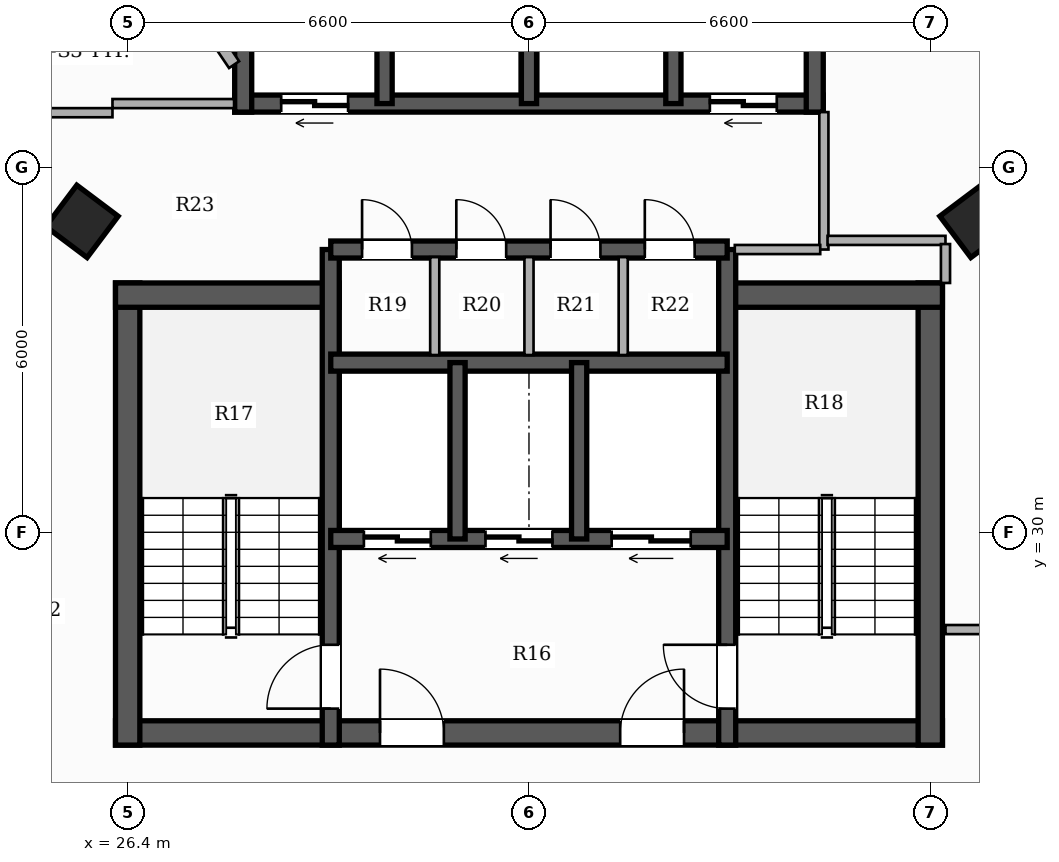
"""IFC4 building model, lengths in metres.
Left out: names, types, materials, properties, quantities, classifications, styles, units other than length and angle.
Written with IfcOpenShell. Run it as: python <this file> out.ifc"""

import sys

from ifc_helpers import new_model, si_unit, direction, frame, frame_2d, origin, origin_2d, place, context, subcontext, project, spatial, rectangle, hollow_rectangle, extrude, element, fill, save


model = new_model("IFC4")
c1 = context("Model", 3, precision=1e-05, world=origin(), true_north=direction((0.0, 1.0)))
c2 = subcontext(c1, "Body", "Model", "MODEL_VIEW")
j1 = project(units=[si_unit("LENGTHUNIT", "METRE"), si_unit("PLANEANGLEUNIT", "RADIAN")], contexts=[c1])
p1 = place(None, origin())
s1 = spatial("IfcSite", under=j1, at=p1, CompositionType="ELEMENT")
p2 = place(p1, origin())
s2 = spatial("IfcBuilding", under=s1, at=p2, CompositionType="ELEMENT")
p3 = place(p2, frame((0.0, 0.0, 183.65)))
s3 = spatial("IfcBuildingStorey", under=s2, at=p3, CompositionType="ELEMENT", Elevation=183.65)
p4 = place(p3, frame((26.2, 26.7, 0.0), z_axis=(0.0, 0.0, 1.0), x_axis=(1.0, 0.0, 0.0)))
e1 = element("IfcWall", 1, at=p4, inside=s3, PredefinedType="SHEAR", context=c2, shape_type="SweptSolid", body=[
    extrude(rectangle(XDim=13.6, YDim=0.4, at=frame_2d((6.8, 0.0))), origin(), (0.0, 0.0, 1.0), 3.3),
])
p5 = place(p4, frame((4.35, 0.0, 0.0)))
e2 = element("IfcOpeningElement", 2, at=p5, cuts=e1, PredefinedType="OPENING", context=c2, shape_type="SweptSolid", body=[
    extrude(rectangle(XDim=1.05, YDim=2.15, at=frame_2d((0.525, 1.075))), frame((0.0, 0.21, 0.0), z_axis=(0.0, -1.0, 0.0), x_axis=(1.0, 0.0, 0.0)), (0.0, 0.0, 1.0), 0.42),
])
p6 = place(p4, frame((8.3, 0.0, 0.0)))
e3 = element("IfcOpeningElement", 3, at=p6, cuts=e1, PredefinedType="OPENING", context=c2, shape_type="SweptSolid", body=[
    extrude(rectangle(XDim=1.05, YDim=2.15, at=frame_2d((0.525, 1.075))), frame((0.0, 0.21, 0.0), z_axis=(0.0, -1.0, 0.0), x_axis=(1.0, 0.0, 0.0)), (0.0, 0.0, 1.0), 0.42),
])
p7 = place(p3, frame((26.4, 26.5, 0.0), z_axis=(0.0, 0.0, 1.0), x_axis=(0.0, 1.0, 0.0)))
e4 = element("IfcWall", 4, at=p7, inside=s3, PredefinedType="SHEAR", context=c2, shape_type="SweptSolid", body=[
    extrude(rectangle(XDim=7.6, YDim=0.4, at=frame_2d((3.8, 0.0))), origin(), (0.0, 0.0, 1.0), 3.3),
])
p8 = place(p3, frame((26.2, 33.9, 0.0), z_axis=(0.0, 0.0, 1.0), x_axis=(1.0, 0.0, 0.0)))
e5 = element("IfcWall", 5, at=p8, inside=s3, PredefinedType="SHEAR", context=c2, shape_type="SweptSolid", body=[
    extrude(rectangle(XDim=3.68, YDim=0.4, at=frame_2d((1.84, 0.0))), origin(), (0.0, 0.0, 1.0), 3.3),
])
p9 = place(p3, frame((39.6, 26.5, 0.0), z_axis=(0.0, 0.0, 1.0), x_axis=(0.0, 1.0, 0.0)))
e6 = element("IfcWall", 6, at=p9, inside=s3, PredefinedType="SHEAR", context=c2, shape_type="SweptSolid", body=[
    extrude(rectangle(XDim=7.6, YDim=0.4, at=frame_2d((3.8, 0.0))), origin(), (0.0, 0.0, 1.0), 3.3),
])
p10 = place(p3, frame((36.12, 33.9, 0.0), z_axis=(0.0, 0.0, 1.0), x_axis=(1.0, 0.0, 0.0)))
e7 = element("IfcWall", 7, at=p10, inside=s3, PredefinedType="SHEAR", context=c2, shape_type="SweptSolid", body=[
    extrude(rectangle(XDim=3.68, YDim=0.4, at=frame_2d((1.84, 0.0))), origin(), (0.0, 0.0, 1.0), 3.3),
])
p11 = place(p3, frame((29.74, 26.5, 0.0), z_axis=(0.0, 0.0, 1.0), x_axis=(0.0, 1.0, 0.0)))
e8 = element("IfcWall", 8, at=p11, inside=s3, PredefinedType="SHEAR", context=c2, shape_type="SweptSolid", body=[
    extrude(rectangle(XDim=8.15, YDim=0.28, at=frame_2d((4.075, 0.0))), origin(), (0.0, 0.0, 1.0), 3.3),
])
p12 = place(p11, frame((0.6, 0.0, 0.0)))
e9 = element("IfcOpeningElement", 9, at=p12, cuts=e8, PredefinedType="OPENING", context=c2, shape_type="SweptSolid", body=[
    extrude(rectangle(XDim=1.05, YDim=2.15, at=frame_2d((0.525, 1.075))), frame((0.0, 0.15, 0.0), z_axis=(0.0, -1.0, 0.0), x_axis=(1.0, 0.0, 0.0)), (0.0, 0.0, 1.0), 0.3),
])
p13 = place(p3, frame((36.26, 26.5, 0.0), z_axis=(0.0, 0.0, 1.0), x_axis=(0.0, 1.0, 0.0)))
e10 = element("IfcWall", 10, at=p13, inside=s3, PredefinedType="SHEAR", context=c2, shape_type="SweptSolid", body=[
    extrude(rectangle(XDim=8.15, YDim=0.28, at=frame_2d((4.075, 0.0))), origin(), (0.0, 0.0, 1.0), 3.3),
])
p14 = place(p13, frame((0.6, 0.0, 0.0)))
e11 = element("IfcOpeningElement", 11, at=p14, cuts=e10, PredefinedType="OPENING", context=c2, shape_type="SweptSolid", body=[
    extrude(rectangle(XDim=1.05, YDim=2.15, at=frame_2d((0.525, 1.075))), frame((0.0, 0.15, 0.0), z_axis=(0.0, -1.0, 0.0), x_axis=(1.0, 0.0, 0.0)), (0.0, 0.0, 1.0), 0.3),
])
p15 = place(p3, frame((36.26, 29.89, 0.0), z_axis=(0.0, 0.0, 1.0), x_axis=(-1.0, 0.0, 0.0)))
e12 = element("IfcWall", 12, at=p15, inside=s3, PredefinedType="SHEAR", context=c2, shape_type="SweptSolid", body=[
    extrude(rectangle(XDim=6.52, YDim=0.28, at=frame_2d((3.26, 0.0))), origin(), (0.0, 0.0, 1.0), 3.3),
])
p16 = place(p15, frame((4.875, 0.0, 0.0)))
e13 = element("IfcOpeningElement", 13, at=p16, cuts=e12, PredefinedType="OPENING", context=c2, shape_type="SweptSolid", body=[
    extrude(rectangle(XDim=1.1, YDim=2.2, at=frame_2d((0.55, 1.1))), frame((0.0, 0.15, 0.0), z_axis=(0.0, -1.0, 0.0), x_axis=(1.0, 0.0, 0.0)), (0.0, 0.0, 1.0), 0.3),
])
p17 = place(p15, frame((2.875, 0.0, 0.0)))
e14 = element("IfcOpeningElement", 14, at=p17, cuts=e12, PredefinedType="OPENING", context=c2, shape_type="SweptSolid", body=[
    extrude(rectangle(XDim=1.1, YDim=2.2, at=frame_2d((0.55, 1.1))), frame((0.0, 0.15, 0.0), z_axis=(0.0, -1.0, 0.0), x_axis=(1.0, 0.0, 0.0)), (0.0, 0.0, 1.0), 0.3),
])
p18 = place(p15, frame((0.6, 0.0, 0.0)))
e15 = element("IfcOpeningElement", 15, at=p18, cuts=e12, PredefinedType="OPENING", context=c2, shape_type="SweptSolid", body=[
    extrude(rectangle(XDim=1.3, YDim=2.2, at=frame_2d((0.65, 1.1))), frame((0.0, 0.15, 0.0), z_axis=(0.0, -1.0, 0.0), x_axis=(1.0, 0.0, 0.0)), (0.0, 0.0, 1.0), 0.3),
])
p19 = place(p3, frame((29.74, 32.79, 0.0), z_axis=(0.0, 0.0, 1.0), x_axis=(1.0, 0.0, 0.0)))
e16 = element("IfcWall", 16, at=p19, inside=s3, PredefinedType="SHEAR", context=c2, shape_type="SweptSolid", body=[
    extrude(rectangle(XDim=6.52, YDim=0.28, at=frame_2d((3.26, 0.0))), origin(), (0.0, 0.0, 1.0), 3.3),
])
for number, where, z_axis, x_axis in (
    (17, (31.825, 29.89, 0.0), (0.0, 0.0, 1.0), (0.0, 1.0, 0.0)),
    (18, (33.825, 29.89, 0.0), (0.0, 0.0, 1.0), (0.0, 1.0, 0.0)),
):
    element("IfcWall", number, at=place(p3, frame(where, z_axis=z_axis, x_axis=x_axis)), inside=s3, PredefinedType="SHEAR", context=c2, shape_type="SweptSolid", body=[
        extrude(rectangle(XDim=2.9, YDim=0.25, at=frame_2d((1.45, 0.0))), origin(), (0.0, 0.0, 1.0), 3.3),
    ])
p20 = place(p3, frame((29.74, 34.65, 0.0), z_axis=(0.0, 0.0, 1.0), x_axis=(1.0, 0.0, 0.0)))
e19 = element("IfcWall", 19, at=p20, inside=s3, PredefinedType="SHEAR", context=c2, shape_type="SweptSolid", body=[
    extrude(rectangle(XDim=6.52, YDim=0.28, at=frame_2d((3.26, 0.0))), origin(), (0.0, 0.0, 1.0), 3.3),
])
p21 = place(p20, frame((0.515, 0.0, 0.0)))
e20 = element("IfcOpeningElement", 20, at=p21, cuts=e19, PredefinedType="OPENING", context=c2, shape_type="SweptSolid", body=[
    extrude(rectangle(XDim=0.82, YDim=2.1, at=frame_2d((0.41, 1.05))), frame((0.0, 0.15, 0.0), z_axis=(0.0, -1.0, 0.0), x_axis=(1.0, 0.0, 0.0)), (0.0, 0.0, 1.0), 0.3),
])
p22 = place(p20, frame((2.065, 0.0, 0.0)))
e21 = element("IfcOpeningElement", 21, at=p22, cuts=e19, PredefinedType="OPENING", context=c2, shape_type="SweptSolid", body=[
    extrude(rectangle(XDim=0.82, YDim=2.1, at=frame_2d((0.41, 1.05))), frame((0.0, 0.15, 0.0), z_axis=(0.0, -1.0, 0.0), x_axis=(1.0, 0.0, 0.0)), (0.0, 0.0, 1.0), 0.3),
])
p23 = place(p20, frame((3.615, 0.0, 0.0)))
e22 = element("IfcOpeningElement", 22, at=p23, cuts=e19, PredefinedType="OPENING", context=c2, shape_type="SweptSolid", body=[
    extrude(rectangle(XDim=0.82, YDim=2.1, at=frame_2d((0.41, 1.05))), frame((0.0, 0.15, 0.0), z_axis=(0.0, -1.0, 0.0), x_axis=(1.0, 0.0, 0.0)), (0.0, 0.0, 1.0), 0.3),
])
p24 = place(p20, frame((5.165, 0.0, 0.0)))
e23 = element("IfcOpeningElement", 23, at=p24, cuts=e19, PredefinedType="OPENING", context=c2, shape_type="SweptSolid", body=[
    extrude(rectangle(XDim=0.82, YDim=2.1, at=frame_2d((0.41, 1.05))), frame((0.0, 0.15, 0.0), z_axis=(0.0, -1.0, 0.0), x_axis=(1.0, 0.0, 0.0)), (0.0, 0.0, 1.0), 0.3),
])
p25 = place(p3, frame((37.84, 37.05, 0.0), z_axis=(0.0, 0.0, 1.0), x_axis=(-1.0, 0.0, 0.0)))
e24 = element("IfcWall", 24, at=p25, inside=s3, PredefinedType="SHEAR", context=c2, shape_type="SweptSolid", body=[
    extrude(rectangle(XDim=9.68, YDim=0.28, at=frame_2d((4.84, 0.0))), origin(), (0.0, 0.0, 1.0), 3.3),
])
p26 = place(p25, frame((7.815, 0.0, 0.0)))
e25 = element("IfcOpeningElement", 25, at=p26, cuts=e24, PredefinedType="OPENING", context=c2, shape_type="SweptSolid", body=[
    extrude(rectangle(XDim=1.1, YDim=2.2, at=frame_2d((0.55, 1.1))), frame((0.0, 0.15, 0.0), z_axis=(0.0, -1.0, 0.0), x_axis=(1.0, 0.0, 0.0)), (0.0, 0.0, 1.0), 0.3),
])
p27 = place(p25, frame((0.765, 0.0, 0.0)))
e26 = element("IfcOpeningElement", 26, at=p27, cuts=e24, PredefinedType="OPENING", context=c2, shape_type="SweptSolid", body=[
    extrude(rectangle(XDim=1.1, YDim=2.2, at=frame_2d((0.55, 1.1))), frame((0.0, 0.15, 0.0), z_axis=(0.0, -1.0, 0.0), x_axis=(1.0, 0.0, 0.0)), (0.0, 0.0, 1.0), 0.3),
])
for number, where, z_axis, x_axis in (
    (27, (28.3, 36.91, 0.0), (0.0, 0.0, 1.0), (0.0, 1.0, 0.0)),
    (28, (37.7, 36.91, 0.0), (0.0, 0.0, 1.0), (0.0, 1.0, 0.0)),
):
    element("IfcWall", number, at=place(p3, frame(where, z_axis=z_axis, x_axis=x_axis)), inside=s3, PredefinedType="SHEAR", context=c2, shape_type="SweptSolid", body=[
        extrude(rectangle(XDim=2.83, YDim=0.28, at=frame_2d((1.415, 0.0))), origin(), (0.0, 0.0, 1.0), 3.3),
    ])
for number, where, z_axis, x_axis in (
    (29, (30.625, 37.05, 0.0), (0.0, 0.0, 1.0), (0.0, 1.0, 0.0)),
    (30, (33.0, 37.05, 0.0), (0.0, 0.0, 1.0), (0.0, 1.0, 0.0)),
    (31, (35.375, 37.05, 0.0), (0.0, 0.0, 1.0), (0.0, 1.0, 0.0)),
):
    element("IfcWall", number, at=place(p3, frame(where, z_axis=z_axis, x_axis=x_axis)), inside=s3, PredefinedType="SHEAR", context=c2, shape_type="SweptSolid", body=[
        extrude(rectangle(XDim=2.55, YDim=0.25, at=frame_2d((1.275, 0.0))), origin(), (0.0, 0.0, 1.0), 3.3),
    ])
for number, where, z_axis, x_axis in (
    (32, (25.648, 35.113, 0.0), (0.0, 0.0, 1.0), (0.6, 0.8, 0.0)),
    (33, (40.352, 35.113, 0.0), (0.0, 0.0, 1.0), (-0.6, 0.8, 0.0)),
):
    element("IfcColumn", number, at=place(p3, frame(where, z_axis=z_axis, x_axis=x_axis)), inside=s3, PredefinedType="COLUMN", context=c2, shape_type="SweptSolid", body=[
        extrude(hollow_rectangle(XDim=0.85, YDim=0.85, WallThickness=0.028, at=origin_2d()), origin(), (0.0, 0.0, 1.0), 3.3),
    ])
p28 = place(p3, frame((37.85, 34.65, 0.0), z_axis=(0.0, 0.0, 1.0), x_axis=(0.0, 1.0, 0.0)))
e34 = element("IfcWall", 34, at=p28, inside=s3, PredefinedType="PARTITIONING", context=c2, shape_type="SweptSolid", body=[
    extrude(rectangle(XDim=2.26, YDim=0.15, at=frame_2d((1.13, 0.0))), origin(), (0.0, 0.0, 1.0), 3.02),
])
p29 = place(p3, frame((36.385, 34.65, 0.0), z_axis=(0.0, 0.0, 1.0), x_axis=(1.0, 0.0, 0.0)))
e35 = element("IfcWall", 35, at=p29, inside=s3, PredefinedType="PARTITIONING", context=c2, shape_type="SweptSolid", body=[
    extrude(rectangle(XDim=1.405, YDim=0.15, at=frame_2d((0.703, 0.0))), origin(), (0.0, 0.0, 1.0), 2.385),
])
for number, where, z_axis, x_axis in (
    (36, (31.45, 32.915, 0.0), (0.0, 0.0, 1.0), (0.0, 1.0, 0.0)),
    (37, (33.0, 32.915, 0.0), (0.0, 0.0, 1.0), (0.0, 1.0, 0.0)),
    (38, (34.55, 32.915, 0.0), (0.0, 0.0, 1.0), (0.0, 1.0, 0.0)),
):
    element("IfcWall", number, at=place(p3, frame(where, z_axis=z_axis, x_axis=x_axis)), inside=s3, PredefinedType="PARTITIONING", context=c2, shape_type="SweptSolid", body=[
        extrude(rectangle(XDim=1.61, YDim=0.15, at=frame_2d((0.805, 0.0))), origin(), (0.0, 0.0, 1.0), 3.02),
    ])
p30 = place(p3, frame((23.56, 36.9, 0.0), z_axis=(0.0, 0.0, 1.0), x_axis=(1.0, 0.0, 0.0)))
e39 = element("IfcWall", 39, at=p30, inside=s3, PredefinedType="PARTITIONING", context=c2, shape_type="SweptSolid", body=[
    extrude(rectangle(XDim=2.59, YDim=0.15, at=frame_2d((1.295, 0.0))), origin(), (0.0, 0.0, 1.0), 2.373),
])
p31 = place(p3, frame((39.85, 28.4, 0.0), z_axis=(0.0, 0.0, 1.0), x_axis=(1.0, 0.0, 0.0)))
e40 = element("IfcWall", 40, at=p31, inside=s3, PredefinedType="PARTITIONING", context=c2, shape_type="SweptSolid", body=[
    extrude(rectangle(XDim=2.5, YDim=0.15, at=frame_2d((1.25, 0.0))), origin(), (0.0, 0.0, 1.0), 2.681),
])
p32 = place(p3, frame((26.15, 37.05, 0.0), z_axis=(0.0, 0.0, 1.0), x_axis=(1.0, 0.0, 0.0)))
e41 = element("IfcWall", 41, at=p32, inside=s3, PredefinedType="PARTITIONING", context=c2, shape_type="SweptSolid", body=[
    extrude(rectangle(XDim=2.0, YDim=0.15, at=frame_2d((1.0, 0.0))), origin(), (0.0, 0.0, 1.0), 2.373),
])
p33 = place(p3, frame((37.91, 34.8, 0.0), z_axis=(0.0, 0.0, 1.0), x_axis=(1.0, 0.0, 0.0)))
e42 = element("IfcWall", 42, at=p33, inside=s3, PredefinedType="PARTITIONING", context=c2, shape_type="SweptSolid", body=[
    extrude(rectangle(XDim=1.94, YDim=0.15, at=frame_2d((0.97, 0.0))), origin(), (0.0, 0.0, 1.0), 2.681),
])
p34 = place(p3, frame((39.85, 34.74, 0.0), z_axis=(0.0, 0.0, 1.0), x_axis=(0.0, -1.0, 0.0)))
e43 = element("IfcWall", 43, at=p34, inside=s3, PredefinedType="PARTITIONING", context=c2, shape_type="SweptSolid", body=[
    extrude(rectangle(XDim=0.64, YDim=0.15, at=frame_2d((0.32, 0.0))), origin(), (0.0, 0.0, 1.0), 2.681),
])
p35 = place(p3, frame((28.15, 37.69, 0.0), z_axis=(0.0, 0.0, 1.0), x_axis=(-0.559089637851, 0.829107216738, 0.0)))
e44 = element("IfcWall", 44, at=p35, inside=s3, PredefinedType="PARTITIONING", context=c2, shape_type="SweptSolid", body=[
    extrude(rectangle(XDim=3.6, YDim=0.2, at=frame_2d((1.8, 0.0))), origin(), (0.0, 0.0, 1.0), 2.373),
])
p36 = place(p12, origin())
e45 = element("IfcDoor", 45, at=p36, inside=s3, OperationType="SINGLE_SWING_LEFT", PredefinedType="DOOR", context=c2, shape_type="SweptSolid", body=[
    extrude(rectangle(XDim=1.05, YDim=2.15, at=frame_2d((0.525, 1.075))), frame((0.0, 0.025, 0.0), z_axis=(0.0, -1.0, 0.0), x_axis=(1.0, 0.0, 0.0)), (0.0, 0.0, 1.0), 0.05),
])
fill(e9, e45)
p37 = place(p14, origin())
e46 = element("IfcDoor", 46, at=p37, inside=s3, OperationType="SINGLE_SWING_RIGHT", PredefinedType="DOOR", context=c2, shape_type="SweptSolid", body=[
    extrude(rectangle(XDim=1.05, YDim=2.15, at=frame_2d((0.525, 1.075))), frame((0.0, 0.025, 0.0), z_axis=(0.0, -1.0, 0.0), x_axis=(1.0, 0.0, 0.0)), (0.0, 0.0, 1.0), 0.05),
])
fill(e11, e46)
p38 = place(p5, origin())
e47 = element("IfcDoor", 47, at=p38, inside=s3, OperationType="SINGLE_SWING_LEFT", PredefinedType="DOOR", context=c2, shape_type="SweptSolid", body=[
    extrude(rectangle(XDim=1.05, YDim=2.15, at=frame_2d((0.525, 1.075))), frame((0.0, 0.025, 0.0), z_axis=(0.0, -1.0, 0.0), x_axis=(1.0, 0.0, 0.0)), (0.0, 0.0, 1.0), 0.05),
])
fill(e2, e47)
p39 = place(p6, origin())
e48 = element("IfcDoor", 48, at=p39, inside=s3, OperationType="SINGLE_SWING_RIGHT", PredefinedType="DOOR", context=c2, shape_type="SweptSolid", body=[
    extrude(rectangle(XDim=1.05, YDim=2.15, at=frame_2d((0.525, 1.075))), frame((0.0, 0.025, 0.0), z_axis=(0.0, -1.0, 0.0), x_axis=(1.0, 0.0, 0.0)), (0.0, 0.0, 1.0), 0.05),
])
fill(e3, e48)
p40 = place(p16, origin())
e49 = element("IfcDoor", 49, at=p40, inside=s3, OperationType="DOUBLE_DOOR_SLIDING", PredefinedType="DOOR", context=c2, shape_type="SweptSolid", body=[
    extrude(rectangle(XDim=1.1, YDim=2.2, at=frame_2d((0.55, 1.1))), frame((0.0, 0.025, 0.0), z_axis=(0.0, -1.0, 0.0), x_axis=(1.0, 0.0, 0.0)), (0.0, 0.0, 1.0), 0.05),
])
fill(e13, e49)
p41 = place(p17, origin())
e50 = element("IfcDoor", 50, at=p41, inside=s3, OperationType="DOUBLE_DOOR_SLIDING", PredefinedType="DOOR", context=c2, shape_type="SweptSolid", body=[
    extrude(rectangle(XDim=1.1, YDim=2.2, at=frame_2d((0.55, 1.1))), frame((0.0, 0.025, 0.0), z_axis=(0.0, -1.0, 0.0), x_axis=(1.0, 0.0, 0.0)), (0.0, 0.0, 1.0), 0.05),
])
fill(e14, e50)
p42 = place(p18, origin())
e51 = element("IfcDoor", 51, at=p42, inside=s3, OperationType="DOUBLE_DOOR_SLIDING", PredefinedType="DOOR", context=c2, shape_type="SweptSolid", body=[
    extrude(rectangle(XDim=1.3, YDim=2.2, at=frame_2d((0.65, 1.1))), frame((0.0, 0.025, 0.0), z_axis=(0.0, -1.0, 0.0), x_axis=(1.0, 0.0, 0.0)), (0.0, 0.0, 1.0), 0.05),
])
fill(e15, e51)
p43 = place(p26, origin())
e52 = element("IfcDoor", 52, at=p43, inside=s3, OperationType="DOUBLE_DOOR_SLIDING", PredefinedType="DOOR", context=c2, shape_type="SweptSolid", body=[
    extrude(rectangle(XDim=1.1, YDim=2.2, at=frame_2d((0.55, 1.1))), frame((0.0, 0.025, 0.0), z_axis=(0.0, -1.0, 0.0), x_axis=(1.0, 0.0, 0.0)), (0.0, 0.0, 1.0), 0.05),
])
fill(e25, e52)
p44 = place(p27, origin())
e53 = element("IfcDoor", 53, at=p44, inside=s3, OperationType="DOUBLE_DOOR_SLIDING", PredefinedType="DOOR", context=c2, shape_type="SweptSolid", body=[
    extrude(rectangle(XDim=1.1, YDim=2.2, at=frame_2d((0.55, 1.1))), frame((0.0, 0.025, 0.0), z_axis=(0.0, -1.0, 0.0), x_axis=(1.0, 0.0, 0.0)), (0.0, 0.0, 1.0), 0.05),
])
fill(e26, e53)
p45 = place(p21, origin())
e54 = element("IfcDoor", 54, at=p45, inside=s3, OperationType="SINGLE_SWING_LEFT", PredefinedType="DOOR", context=c2, shape_type="SweptSolid", body=[
    extrude(rectangle(XDim=0.82, YDim=2.1, at=frame_2d((0.41, 1.05))), frame((0.0, 0.025, 0.0), z_axis=(0.0, -1.0, 0.0), x_axis=(1.0, 0.0, 0.0)), (0.0, 0.0, 1.0), 0.05),
])
fill(e20, e54)
p46 = place(p22, origin())
e55 = element("IfcDoor", 55, at=p46, inside=s3, OperationType="SINGLE_SWING_LEFT", PredefinedType="DOOR", context=c2, shape_type="SweptSolid", body=[
    extrude(rectangle(XDim=0.82, YDim=2.1, at=frame_2d((0.41, 1.05))), frame((0.0, 0.025, 0.0), z_axis=(0.0, -1.0, 0.0), x_axis=(1.0, 0.0, 0.0)), (0.0, 0.0, 1.0), 0.05),
])
fill(e21, e55)
p47 = place(p23, origin())
e56 = element("IfcDoor", 56, at=p47, inside=s3, OperationType="SINGLE_SWING_LEFT", PredefinedType="DOOR", context=c2, shape_type="SweptSolid", body=[
    extrude(rectangle(XDim=0.82, YDim=2.1, at=frame_2d((0.41, 1.05))), frame((0.0, 0.025, 0.0), z_axis=(0.0, -1.0, 0.0), x_axis=(1.0, 0.0, 0.0)), (0.0, 0.0, 1.0), 0.05),
])
fill(e22, e56)
p48 = place(p24, origin())
e57 = element("IfcDoor", 57, at=p48, inside=s3, OperationType="SINGLE_SWING_LEFT", PredefinedType="DOOR", context=c2, shape_type="SweptSolid", body=[
    extrude(rectangle(XDim=0.82, YDim=2.1, at=frame_2d((0.41, 1.05))), frame((0.0, 0.025, 0.0), z_axis=(0.0, -1.0, 0.0), x_axis=(1.0, 0.0, 0.0)), (0.0, 0.0, 1.0), 0.05),
])
fill(e23, e57)
save(model, sys.argv[1])
